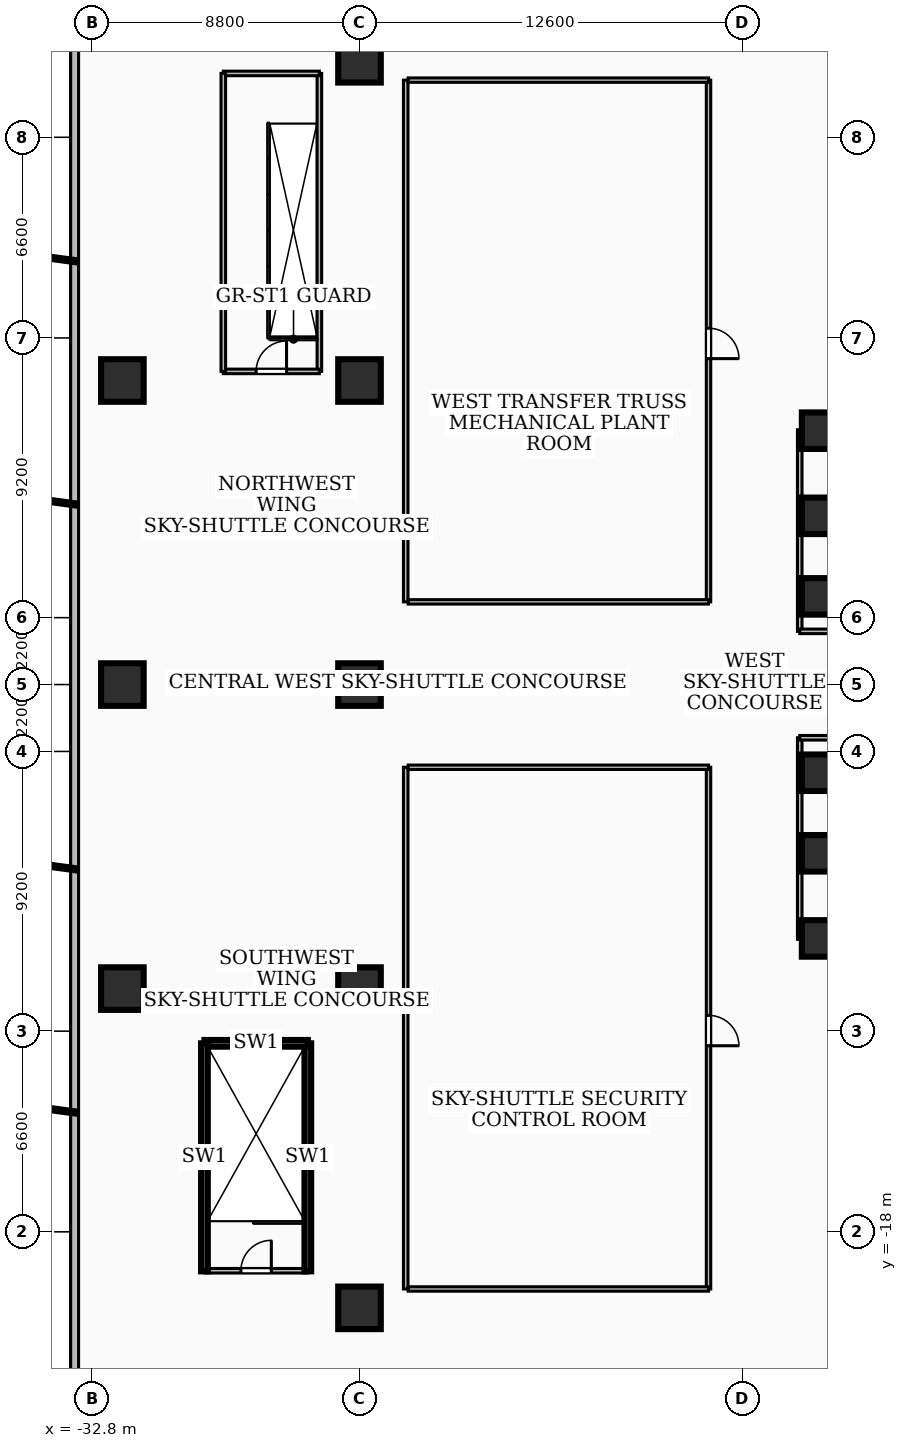
"""IFC4 building model, lengths in metres.
Left out: names, types, materials, properties, quantities, classifications, styles, units other than length and angle.
Written with IfcOpenShell. Run it as: python <this file> out.ifc"""

import sys

from ifc_helpers import new_model, si_unit, direction, frame, frame_2d, origin, origin_2d, place, context, subcontext, project, spatial, rectangle, extrude, element, fill, save


model = new_model("IFC4")
c1 = context("Model", 3, precision=1e-05, world=origin(), true_north=direction((0.0, 1.0)))
c2 = subcontext(c1, "Body", "Model", "MODEL_VIEW")
j1 = project(units=[si_unit("LENGTHUNIT", "METRE"), si_unit("PLANEANGLEUNIT", "RADIAN")], contexts=[c1])
p1 = place(None, origin())
s1 = spatial("IfcSite", under=j1, at=p1, CompositionType="ELEMENT")
p2 = place(p1, origin())
s2 = spatial("IfcBuilding", under=s1, at=p2, CompositionType="ELEMENT")
p3 = place(p2, frame((0.0, 0.0, 19.44)))
s3 = spatial("IfcBuildingStorey", under=s2, at=p3, CompositionType="ELEMENT", Elevation=19.44)
for number, where, z_axis, x_axis in (
    (1, (-8.78, 8.585, 0.0), (0.0, 0.0, 1.0), (1.0, 0.0, 0.0)),
    (2, (8.78, -8.585, 0.0), (0.0, 0.0, 1.0), (-1.0, 0.0, 0.0)),
):
    element("IfcWall", number, at=place(p3, frame(where, z_axis=z_axis, x_axis=x_axis)), inside=s3, PredefinedType="SHEAR", context=c2, shape_type="SweptSolid", body=[
        extrude(rectangle(XDim=17.56, YDim=0.55, at=frame_2d((8.78, 0.0))), origin(), (0.0, 0.0, 1.0), 4.78),
    ])
for number, where, z_axis, x_axis in (
    (3, (-29.1, -19.3, 0.0), (0.0, 0.0, 1.0), (0.0, 1.0, 0.0)),
    (4, (-25.7, -19.3, 0.0), (0.0, 0.0, 1.0), (0.0, 1.0, 0.0)),
):
    element("IfcWall", number, at=place(p3, frame(where, z_axis=z_axis, x_axis=x_axis)), inside=s3, PredefinedType="SOLIDWALL", context=c2, shape_type="SweptSolid", body=[
        extrude(rectangle(XDim=7.5, YDim=0.22, at=frame_2d((3.75, 0.0))), origin(), (0.0, 0.0, 1.0), 4.78),
    ])
p4 = place(p3, frame((-29.1, -11.8, 0.0), z_axis=(0.0, 0.0, 1.0), x_axis=(1.0, 0.0, 0.0)))
e5 = element("IfcWall", 5, at=p4, inside=s3, PredefinedType="SOLIDWALL", context=c2, shape_type="SweptSolid", body=[
    extrude(rectangle(XDim=3.4, YDim=0.22, at=frame_2d((1.7, 0.0))), origin(), (0.0, 0.0, 1.0), 4.78),
])
for number, where, z_axis, x_axis in (
    (6, (-8.85, -5.55, 0.0), (0.0, 0.0, 1.0), (1.0, 0.0, 0.0)),
    (7, (-8.85, -2.9, 0.0), (0.0, 0.0, 1.0), (1.0, 0.0, 0.0)),
    (8, (-8.85, 2.9, 0.0), (0.0, 0.0, 1.0), (1.0, 0.0, 0.0)),
    (9, (-8.85, 5.55, 0.0), (0.0, 0.0, 1.0), (1.0, 0.0, 0.0)),
    (10, (-8.85, 8.35, 0.0), (0.0, 0.0, 1.0), (1.0, 0.0, 0.0)),
    (11, (-8.85, -8.35, 0.0), (0.0, 0.0, 1.0), (1.0, 0.0, 0.0)),
):
    element("IfcColumn", number, at=place(p3, frame(where, z_axis=z_axis, x_axis=x_axis)), inside=s3, PredefinedType="COLUMN", context=c2, shape_type="SweptSolid", body=[
        extrude(rectangle(XDim=1.2, YDim=1.2, at=origin_2d()), origin(), (0.0, 0.0, 1.0), 5.04),
    ])
for number, where, z_axis, x_axis in (
    (12, (-31.8, -10.0, 0.0), (0.0, 0.0, 1.0), (1.0, 0.0, 0.0)),
    (13, (-31.8, 0.0, 0.0), (0.0, 0.0, 1.0), (1.0, 0.0, 0.0)),
    (14, (-31.8, 10.0, 0.0), (0.0, 0.0, 1.0), (1.0, 0.0, 0.0)),
    (15, (-24.0, -10.0, 0.0), (0.0, 0.0, 1.0), (1.0, 0.0, 0.0)),
    (16, (-24.0, 0.0, 0.0), (0.0, 0.0, 1.0), (1.0, 0.0, 0.0)),
    (17, (-24.0, 10.0, 0.0), (0.0, 0.0, 1.0), (1.0, 0.0, 0.0)),
    (18, (-24.0, -20.5, 0.0), (0.0, 0.0, 1.0), (1.0, 0.0, 0.0)),
    (19, (-24.0, 20.5, 0.0), (0.0, 0.0, 1.0), (1.0, 0.0, 0.0)),
):
    element("IfcColumn", number, at=place(p3, frame(where, z_axis=z_axis, x_axis=x_axis)), inside=s3, PredefinedType="COLUMN", context=c2, shape_type="SweptSolid", body=[
        extrude(rectangle(XDim=1.4, YDim=1.4, at=origin_2d()), origin(), (0.0, 0.0, 1.0), 5.04),
    ])
p5 = place(p3, frame((-33.37, -27.14, 0.0), z_axis=(0.0, 0.0, 1.0), x_axis=(0.0, 1.0, 0.0)))
e20 = element("IfcWall", 20, at=p5, inside=s3, PredefinedType="SOLIDWALL", context=c2, shape_type="SweptSolid", body=[
    extrude(rectangle(XDim=54.28, YDim=0.26, at=frame_2d((27.14, 0.0))), origin(), (0.0, 0.0, 1.0), 4.78),
])
p6 = place(p3, frame((-29.08, -19.28, 0.0), z_axis=(0.0, 0.0, 1.0), x_axis=(1.0, 0.0, 0.0)))
e21 = element("IfcWall", 21, at=p6, inside=s3, PredefinedType="PARTITIONING", context=c2, shape_type="SweptSolid", body=[
    extrude(rectangle(XDim=3.36, YDim=0.15, at=frame_2d((1.68, 0.0))), origin(), (0.0, 0.0, 1.0), 4.78),
])
p7 = place(p6, frame((1.18, 0.0, 0.0)))
e22 = element("IfcOpeningElement", 22, at=p7, cuts=e21, PredefinedType="OPENING", context=c2, shape_type="SweptSolid", body=[
    extrude(rectangle(XDim=1.0, YDim=2.1, at=frame_2d((0.5, 1.05))), frame((0.0, 0.085, 0.0), z_axis=(0.0, -1.0, 0.0), x_axis=(1.0, 0.0, 0.0)), (0.0, 0.0, 1.0), 0.17),
])
for number, where, z_axis, x_axis in (
    (23, (-28.48, 10.3, 0.0), (0.0, 0.0, 1.0), (0.0, 1.0, 0.0)),
    (24, (-25.32, 10.3, 0.0), (0.0, 0.0, 1.0), (0.0, 1.0, 0.0)),
):
    element("IfcWall", number, at=place(p3, frame(where, z_axis=z_axis, x_axis=x_axis)), inside=s3, PredefinedType="PARTITIONING", context=c2, shape_type="SweptSolid", body=[
        extrude(rectangle(XDim=9.8, YDim=0.15, at=frame_2d((4.9, 0.0))), origin(), (0.0, 0.0, 1.0), 2.572),
    ])
p8 = place(p3, frame((-28.48, 10.3, 0.0), z_axis=(0.0, 0.0, 1.0), x_axis=(1.0, 0.0, 0.0)))
e25 = element("IfcWall", 25, at=p8, inside=s3, PredefinedType="PARTITIONING", context=c2, shape_type="SweptSolid", body=[
    extrude(rectangle(XDim=3.16, YDim=0.15, at=frame_2d((1.58, 0.0))), origin(), (0.0, 0.0, 1.0), 2.572),
])
p9 = place(p8, frame((1.08, 0.0, 0.0)))
e26 = element("IfcOpeningElement", 26, at=p9, cuts=e25, PredefinedType="OPENING", context=c2, shape_type="SweptSolid", body=[
    extrude(rectangle(XDim=1.0, YDim=2.1, at=frame_2d((0.5, 1.05))), frame((0.0, 0.085, 0.0), z_axis=(0.0, -1.0, 0.0), x_axis=(1.0, 0.0, 0.0)), (0.0, 0.0, 1.0), 0.17),
])
p10 = place(p3, frame((-25.32, 20.1, 0.0), z_axis=(0.0, 0.0, 1.0), x_axis=(-1.0, 0.0, 0.0)))
e27 = element("IfcWall", 27, at=p10, inside=s3, PredefinedType="PARTITIONING", context=c2, shape_type="SweptSolid", body=[
    extrude(rectangle(XDim=3.16, YDim=0.15, at=frame_2d((1.58, 0.0))), origin(), (0.0, 0.0, 1.0), 4.78),
])
p11 = place(p3, frame((-9.52, 1.75, 0.0), z_axis=(0.0, 0.0, 1.0), x_axis=(0.0, 1.0, 0.0)))
e28 = element("IfcWall", 28, at=p11, inside=s3, PredefinedType="PARTITIONING", context=c2, shape_type="SweptSolid", body=[
    extrude(rectangle(XDim=6.63, YDim=0.15, at=frame_2d((3.315, 0.0))), origin(), (0.0, 0.0, 1.0), 2.572),
])
p12 = place(p3, frame((-7.85, 1.75, 0.0), z_axis=(0.0, 0.0, 1.0), x_axis=(-1.0, 0.0, 0.0)))
e29 = element("IfcWall", 29, at=p12, inside=s3, PredefinedType="PARTITIONING", context=c2, shape_type="SweptSolid", body=[
    extrude(rectangle(XDim=1.67, YDim=0.15, at=frame_2d((0.835, 0.0))), origin(), (0.0, 0.0, 1.0), 3.845),
])
p13 = place(p3, frame((-9.52, -8.38, 0.0), z_axis=(0.0, 0.0, 1.0), x_axis=(0.0, 1.0, 0.0)))
e30 = element("IfcWall", 30, at=p13, inside=s3, PredefinedType="PARTITIONING", context=c2, shape_type="SweptSolid", body=[
    extrude(rectangle(XDim=6.63, YDim=0.15, at=frame_2d((3.315, 0.0))), origin(), (0.0, 0.0, 1.0), 2.572),
])
p14 = place(p3, frame((-7.85, -1.75, 0.0), z_axis=(0.0, 0.0, 1.0), x_axis=(-1.0, 0.0, 0.0)))
e31 = element("IfcWall", 31, at=p14, inside=s3, PredefinedType="PARTITIONING", context=c2, shape_type="SweptSolid", body=[
    extrude(rectangle(XDim=1.67, YDim=0.15, at=frame_2d((0.835, 0.0))), origin(), (0.0, 0.0, 1.0), 3.845),
])
p15 = place(p3, frame((-12.52, 19.88, 0.0), z_axis=(0.0, 0.0, 1.0), x_axis=(0.0, -1.0, 0.0)))
e32 = element("IfcWall", 32, at=p15, inside=s3, PredefinedType="PARTITIONING", context=c2, shape_type="SweptSolid", body=[
    extrude(rectangle(XDim=17.16, YDim=0.145, at=frame_2d((8.58, 0.0))), origin(), (0.0, 0.0, 1.0), 2.572),
])
p16 = place(p15, frame((8.16, 0.0, 0.0)))
e33 = element("IfcOpeningElement", 33, at=p16, cuts=e32, PredefinedType="OPENING", context=c2, shape_type="SweptSolid", body=[
    extrude(rectangle(XDim=1.0, YDim=2.1, at=frame_2d((0.5, 1.05))), frame((0.0, 0.083, 0.0), z_axis=(0.0, -1.0, 0.0), x_axis=(1.0, 0.0, 0.0)), (0.0, 0.0, 1.0), 0.165),
])
p17 = place(p3, frame((-22.4, 2.72, 0.0), z_axis=(0.0, 0.0, 1.0), x_axis=(1.0, 0.0, 0.0)))
e34 = element("IfcWall", 34, at=p17, inside=s3, PredefinedType="PARTITIONING", context=c2, shape_type="SweptSolid", body=[
    extrude(rectangle(XDim=9.88, YDim=0.145, at=frame_2d((4.94, 0.0))), origin(), (0.0, 0.0, 1.0), 2.572),
])
p18 = place(p3, frame((-22.4, 19.88, 0.0), z_axis=(0.0, 0.0, 1.0), x_axis=(1.0, 0.0, 0.0)))
e35 = element("IfcWall", 35, at=p18, inside=s3, PredefinedType="PARTITIONING", context=c2, shape_type="SweptSolid", body=[
    extrude(rectangle(XDim=9.88, YDim=0.145, at=frame_2d((4.94, 0.0))), origin(), (0.0, 0.0, 1.0), 4.78),
])
p19 = place(p3, frame((-22.48, 2.72, 0.0), z_axis=(0.0, 0.0, 1.0), x_axis=(0.0, 1.0, 0.0)))
e36 = element("IfcWall", 36, at=p19, inside=s3, PredefinedType="PARTITIONING", context=c2, shape_type="SweptSolid", body=[
    extrude(rectangle(XDim=17.16, YDim=0.15, at=frame_2d((8.58, 0.0))), origin(), (0.0, 0.0, 1.0), 2.572),
])
p20 = place(p3, frame((-12.52, -2.72, 0.0), z_axis=(0.0, 0.0, 1.0), x_axis=(0.0, -1.0, 0.0)))
e37 = element("IfcWall", 37, at=p20, inside=s3, PredefinedType="PARTITIONING", context=c2, shape_type="SweptSolid", body=[
    extrude(rectangle(XDim=17.16, YDim=0.145, at=frame_2d((8.58, 0.0))), origin(), (0.0, 0.0, 1.0), 2.572),
])
p21 = place(p20, frame((8.16, 0.0, 0.0)))
e38 = element("IfcOpeningElement", 38, at=p21, cuts=e37, PredefinedType="OPENING", context=c2, shape_type="SweptSolid", body=[
    extrude(rectangle(XDim=1.0, YDim=2.1, at=frame_2d((0.5, 1.05))), frame((0.0, 0.083, 0.0), z_axis=(0.0, -1.0, 0.0), x_axis=(1.0, 0.0, 0.0)), (0.0, 0.0, 1.0), 0.165),
])
p22 = place(p3, frame((-22.4, -19.88, 0.0), z_axis=(0.0, 0.0, 1.0), x_axis=(1.0, 0.0, 0.0)))
e39 = element("IfcWall", 39, at=p22, inside=s3, PredefinedType="PARTITIONING", context=c2, shape_type="SweptSolid", body=[
    extrude(rectangle(XDim=9.88, YDim=0.145, at=frame_2d((4.94, 0.0))), origin(), (0.0, 0.0, 1.0), 4.78),
])
p23 = place(p3, frame((-22.4, -2.72, 0.0), z_axis=(0.0, 0.0, 1.0), x_axis=(1.0, 0.0, 0.0)))
e40 = element("IfcWall", 40, at=p23, inside=s3, PredefinedType="PARTITIONING", context=c2, shape_type="SweptSolid", body=[
    extrude(rectangle(XDim=9.88, YDim=0.145, at=frame_2d((4.94, 0.0))), origin(), (0.0, 0.0, 1.0), 2.572),
])
p24 = place(p3, frame((-22.48, -19.88, 0.0), z_axis=(0.0, 0.0, 1.0), x_axis=(0.0, 1.0, 0.0)))
e41 = element("IfcWall", 41, at=p24, inside=s3, PredefinedType="PARTITIONING", context=c2, shape_type="SweptSolid", body=[
    extrude(rectangle(XDim=17.16, YDim=0.15, at=frame_2d((8.58, 0.0))), origin(), (0.0, 0.0, 1.0), 2.572),
])
p25 = place(p7, origin())
e42 = element("IfcDoor", 42, at=p25, inside=s3, OperationType="SINGLE_SWING_RIGHT", PredefinedType="DOOR", context=c2, shape_type="SweptSolid", body=[
    extrude(rectangle(XDim=1.0, YDim=2.1, at=frame_2d((0.5, 1.05))), frame((0.0, 0.025, 0.0), z_axis=(0.0, -1.0, 0.0), x_axis=(1.0, 0.0, 0.0)), (0.0, 0.0, 1.0), 0.05),
])
fill(e22, e42)
p26 = place(p9, origin())
e43 = element("IfcDoor", 43, at=p26, inside=s3, OperationType="SINGLE_SWING_RIGHT", PredefinedType="DOOR", context=c2, shape_type="SweptSolid", body=[
    extrude(rectangle(XDim=1.0, YDim=2.1, at=frame_2d((0.5, 1.05))), frame((0.0, 0.025, 0.0), z_axis=(0.0, -1.0, 0.0), x_axis=(1.0, 0.0, 0.0)), (0.0, 0.0, 1.0), 0.05),
])
fill(e26, e43)
p27 = place(p16, origin())
e44 = element("IfcDoor", 44, at=p27, inside=s3, OperationType="SINGLE_SWING_RIGHT", PredefinedType="DOOR", context=c2, shape_type="SweptSolid", body=[
    extrude(rectangle(XDim=1.0, YDim=2.1, at=frame_2d((0.5, 1.05))), frame((0.0, 0.025, 0.0), z_axis=(0.0, -1.0, 0.0), x_axis=(1.0, 0.0, 0.0)), (0.0, 0.0, 1.0), 0.05),
])
fill(e33, e44)
p28 = place(p21, origin())
e45 = element("IfcDoor", 45, at=p28, inside=s3, OperationType="SINGLE_SWING_RIGHT", PredefinedType="DOOR", context=c2, shape_type="SweptSolid", body=[
    extrude(rectangle(XDim=1.0, YDim=2.1, at=frame_2d((0.5, 1.05))), frame((0.0, 0.025, 0.0), z_axis=(0.0, -1.0, 0.0), x_axis=(1.0, 0.0, 0.0)), (0.0, 0.0, 1.0), 0.05),
])
fill(e38, e45)
save(model, sys.argv[1])
